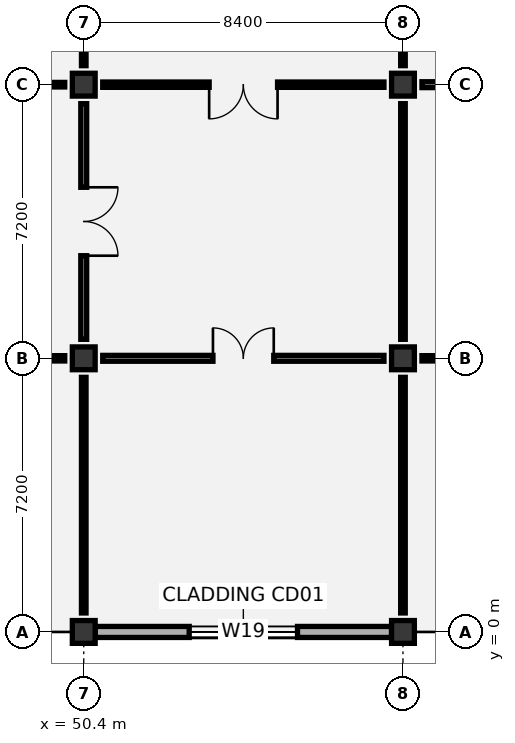
"""IFC4 building model, lengths in metres.
Left out: names, types, materials, properties, quantities, classifications, styles, units other than length and angle.
Written with IfcOpenShell. Run it as: python <this file> out.ifc"""

import sys

from ifc_helpers import new_model, si_unit, direction, frame, frame_2d, origin, origin_2d, place, context, subcontext, project, spatial, rectangle, extrude, element, fill, save


model = new_model("IFC4")
c1 = context("Model", 3, precision=1e-05, world=origin(), true_north=direction((0.0, 1.0)))
c2 = subcontext(c1, "Body", "Model", "MODEL_VIEW")
j1 = project(units=[si_unit("LENGTHUNIT", "METRE"), si_unit("PLANEANGLEUNIT", "RADIAN")], contexts=[c1])
p1 = place(None, origin())
s1 = spatial("IfcSite", under=j1, at=p1, CompositionType="ELEMENT")
p2 = place(p1, origin())
s2 = spatial("IfcBuilding", under=s1, at=p2, CompositionType="ELEMENT")
p3 = place(p2, frame((0.0, 0.0, 11.4)))
s3 = spatial("IfcBuildingStorey", under=s2, at=p3, CompositionType="ELEMENT", Elevation=11.4)
for number, where, z_axis, x_axis in (
    (1, (50.4, 0.0, 0.0), (0.0, 0.0, 1.0), (1.0, 0.0, 0.0)),
    (2, (50.4, 7.2, 0.0), (0.0, 0.0, 1.0), (1.0, 0.0, 0.0)),
    (3, (50.4, 14.4, 0.0), (0.0, 0.0, 1.0), (1.0, 0.0, 0.0)),
    (4, (58.8, 0.0, 0.0), (0.0, 0.0, 1.0), (1.0, 0.0, 0.0)),
    (5, (58.8, 7.2, 0.0), (0.0, 0.0, 1.0), (1.0, 0.0, 0.0)),
    (6, (58.8, 14.4, 0.0), (0.0, 0.0, 1.0), (1.0, 0.0, 0.0)),
):
    element("IfcColumn", number, at=place(p3, frame(where, z_axis=z_axis, x_axis=x_axis)), inside=s3, PredefinedType="COLUMN", context=c2, shape_type="SweptSolid", body=[
        extrude(rectangle(XDim=0.6, YDim=0.6, at=origin_2d()), origin(), (0.0, 0.0, 1.0), 5.4),
    ])
p4 = place(p3, frame((50.7, 0.0, 0.0), z_axis=(0.0, 0.0, 1.0), x_axis=(1.0, 0.0, 0.0)))
e7 = element("IfcWall", 7, at=p4, inside=s3, PredefinedType="SOLIDWALL", context=c2, shape_type="SweptSolid", body=[
    extrude(rectangle(XDim=7.8, YDim=0.29, at=frame_2d((3.9, 0.0))), origin(), (0.0, 0.0, 1.0), 4.52),
])
p5 = place(p4, frame((2.475, 0.0, 0.9)))
e8 = element("IfcOpeningElement", 8, at=p5, cuts=e7, PredefinedType="OPENING", context=c2, shape_type="SweptSolid", body=[
    extrude(rectangle(XDim=2.85, YDim=1.95, at=frame_2d((1.425, 0.975))), frame((0.0, 0.155, 0.0), z_axis=(0.0, -1.0, 0.0), x_axis=(1.0, 0.0, 0.0)), (0.0, 0.0, 1.0), 0.31),
])
p6 = place(p3, frame((50.4, 0.5, 0.0), z_axis=(0.0, 0.0, 1.0), x_axis=(0.0, 1.0, 0.0)))
e9 = element("IfcWall", 9, at=p6, inside=s3, PredefinedType="PARTITIONING", context=c2, shape_type="SweptSolid", body=[
    extrude(rectangle(XDim=6.2, YDim=0.12, at=frame_2d((3.1, 0.0))), origin(), (0.0, 0.0, 1.0), 4.88),
])
p7 = place(p3, frame((42.5, 7.2, 0.0), z_axis=(0.0, 0.0, 1.0), x_axis=(1.0, 0.0, 0.0)))
e10 = element("IfcWall", 10, at=p7, inside=s3, PredefinedType="PARTITIONING", context=c2, shape_type="SweptSolid", body=[
    extrude(rectangle(XDim=7.4, YDim=0.14, at=frame_2d((3.7, 0.0))), origin(), (0.0, 0.0, 1.0), 4.345),
])
p8 = place(p7, frame((2.9, 0.0, 0.0)))
e11 = element("IfcOpeningElement", 11, at=p8, cuts=e10, PredefinedType="OPENING", context=c2, shape_type="SweptSolid", body=[
    extrude(rectangle(XDim=1.6, YDim=2.2, at=frame_2d((0.8, 1.1))), frame((0.0, 0.08, 0.0), z_axis=(0.0, -1.0, 0.0), x_axis=(1.0, 0.0, 0.0)), (0.0, 0.0, 1.0), 0.16),
])
p9 = place(p3, frame((50.4, 7.7, 0.0), z_axis=(0.0, 0.0, 1.0), x_axis=(0.0, 1.0, 0.0)))
e12 = element("IfcWall", 12, at=p9, inside=s3, PredefinedType="PARTITIONING", context=c2, shape_type="SweptSolid", body=[
    extrude(rectangle(XDim=6.2, YDim=0.155, at=frame_2d((3.1, 0.0))), origin(), (0.0, 0.0, 1.0), 4.395),
])
p10 = place(p9, frame((2.2, 0.0, 0.0)))
e13 = element("IfcOpeningElement", 13, at=p10, cuts=e12, PredefinedType="OPENING", context=c2, shape_type="SweptSolid", body=[
    extrude(rectangle(XDim=1.8, YDim=2.25, at=frame_2d((0.9, 1.125))), frame((0.0, 0.087, 0.0), z_axis=(0.0, -1.0, 0.0), x_axis=(1.0, 0.0, 0.0)), (0.0, 0.0, 1.0), 0.175),
])
p11 = place(p3, frame((42.5, 14.4, 0.0), z_axis=(0.0, 0.0, 1.0), x_axis=(1.0, 0.0, 0.0)))
e14 = element("IfcWall", 14, at=p11, inside=s3, PredefinedType="PARTITIONING", context=c2, shape_type="SweptSolid", body=[
    extrude(rectangle(XDim=7.4, YDim=0.12, at=frame_2d((3.7, 0.0))), origin(), (0.0, 0.0, 1.0), 4.345),
])
p12 = place(p3, frame((50.4, 14.9, 0.0), z_axis=(0.0, 0.0, 1.0), x_axis=(0.0, 1.0, 0.0)))
e15 = element("IfcWall", 15, at=p12, inside=s3, PredefinedType="PARTITIONING", context=c2, shape_type="SweptSolid", body=[
    extrude(rectangle(XDim=6.2, YDim=0.12, at=frame_2d((3.1, 0.0))), origin(), (0.0, 0.0, 1.0), 4.595),
])
p13 = place(p3, frame((58.8, 0.5, 0.0), z_axis=(0.0, 0.0, 1.0), x_axis=(0.0, 1.0, 0.0)))
e16 = element("IfcWall", 16, at=p13, inside=s3, PredefinedType="PARTITIONING", context=c2, shape_type="SweptSolid", body=[
    extrude(rectangle(XDim=6.2, YDim=0.12, at=frame_2d((3.1, 0.0))), origin(), (0.0, 0.0, 1.0), 4.47),
])
p14 = place(p3, frame((50.9, 7.2, 0.0), z_axis=(0.0, 0.0, 1.0), x_axis=(1.0, 0.0, 0.0)))
e17 = element("IfcWall", 17, at=p14, inside=s3, PredefinedType="PARTITIONING", context=c2, shape_type="SweptSolid", body=[
    extrude(rectangle(XDim=7.4, YDim=0.155, at=frame_2d((3.7, 0.0))), origin(), (0.0, 0.0, 1.0), 4.345),
])
p15 = place(p14, frame((2.9, 0.0, 0.0)))
e18 = element("IfcOpeningElement", 18, at=p15, cuts=e17, PredefinedType="OPENING", context=c2, shape_type="SweptSolid", body=[
    extrude(rectangle(XDim=1.6, YDim=2.2, at=frame_2d((0.8, 1.1))), frame((0.0, 0.087, 0.0), z_axis=(0.0, -1.0, 0.0), x_axis=(1.0, 0.0, 0.0)), (0.0, 0.0, 1.0), 0.175),
])
p16 = place(p3, frame((58.8, 7.7, 0.0), z_axis=(0.0, 0.0, 1.0), x_axis=(0.0, 1.0, 0.0)))
e19 = element("IfcWall", 19, at=p16, inside=s3, PredefinedType="PARTITIONING", context=c2, shape_type="SweptSolid", body=[
    extrude(rectangle(XDim=6.2, YDim=0.12, at=frame_2d((3.1, 0.0))), origin(), (0.0, 0.0, 1.0), 4.595),
])
p17 = place(p3, frame((50.9, 14.4, 0.0), z_axis=(0.0, 0.0, 1.0), x_axis=(1.0, 0.0, 0.0)))
e20 = element("IfcWall", 20, at=p17, inside=s3, PredefinedType="PARTITIONING", context=c2, shape_type="SweptSolid", body=[
    extrude(rectangle(XDim=7.4, YDim=0.14, at=frame_2d((3.7, 0.0))), origin(), (0.0, 0.0, 1.0), 4.345),
])
p18 = place(p17, frame((2.8, 0.0, 0.0)))
e21 = element("IfcOpeningElement", 21, at=p18, cuts=e20, PredefinedType="OPENING", context=c2, shape_type="SweptSolid", body=[
    extrude(rectangle(XDim=1.8, YDim=2.25, at=frame_2d((0.9, 1.125))), frame((0.0, 0.08, 0.0), z_axis=(0.0, -1.0, 0.0), x_axis=(1.0, 0.0, 0.0)), (0.0, 0.0, 1.0), 0.16),
])
p19 = place(p3, frame((58.8, 14.9, 0.0), z_axis=(0.0, 0.0, 1.0), x_axis=(0.0, 1.0, 0.0)))
e22 = element("IfcWall", 22, at=p19, inside=s3, PredefinedType="PARTITIONING", context=c2, shape_type="SweptSolid", body=[
    extrude(rectangle(XDim=6.2, YDim=0.12, at=frame_2d((3.1, 0.0))), origin(), (0.0, 0.0, 1.0), 4.395),
])
p20 = place(p3, frame((59.3, 7.2, 0.0), z_axis=(0.0, 0.0, 1.0), x_axis=(1.0, 0.0, 0.0)))
e23 = element("IfcWall", 23, at=p20, inside=s3, PredefinedType="PARTITIONING", context=c2, shape_type="SweptSolid", body=[
    extrude(rectangle(XDim=7.4, YDim=0.14, at=frame_2d((3.7, 0.0))), origin(), (0.0, 0.0, 1.0), 4.345),
])
p21 = place(p20, frame((2.9, 0.0, 0.0)))
e24 = element("IfcOpeningElement", 24, at=p21, cuts=e23, PredefinedType="OPENING", context=c2, shape_type="SweptSolid", body=[
    extrude(rectangle(XDim=1.6, YDim=2.2, at=frame_2d((0.8, 1.1))), frame((0.0, 0.08, 0.0), z_axis=(0.0, -1.0, 0.0), x_axis=(1.0, 0.0, 0.0)), (0.0, 0.0, 1.0), 0.16),
])
p22 = place(p3, frame((59.3, 14.4, 0.0), z_axis=(0.0, 0.0, 1.0), x_axis=(1.0, 0.0, 0.0)))
e25 = element("IfcWall", 25, at=p22, inside=s3, PredefinedType="PARTITIONING", context=c2, shape_type="SweptSolid", body=[
    extrude(rectangle(XDim=7.4, YDim=0.155, at=frame_2d((3.7, 0.0))), origin(), (0.0, 0.0, 1.0), 4.345),
])
p23 = place(p22, frame((2.8, 0.0, 0.0)))
e26 = element("IfcOpeningElement", 26, at=p23, cuts=e25, PredefinedType="OPENING", context=c2, shape_type="SweptSolid", body=[
    extrude(rectangle(XDim=1.8, YDim=2.25, at=frame_2d((0.9, 1.125))), frame((0.0, 0.087, 0.0), z_axis=(0.0, -1.0, 0.0), x_axis=(1.0, 0.0, 0.0)), (0.0, 0.0, 1.0), 0.175),
])
p24 = place(p5, origin())
e27 = element("IfcWindow", 27, at=p24, inside=s3, PartitioningType="SINGLE_PANEL", PredefinedType="WINDOW", context=c2, shape_type="SweptSolid", body=[
    extrude(rectangle(XDim=2.85, YDim=1.95, at=frame_2d((1.425, 0.975))), frame((0.0, 0.03, 0.0), z_axis=(0.0, -1.0, 0.0), x_axis=(1.0, 0.0, 0.0)), (0.0, 0.0, 1.0), 0.06),
])
fill(e8, e27)
p25 = place(p10, frame((1.8, 0.0, 0.0), z_axis=(0.0, 0.0, 1.0), x_axis=(-1.0, 0.0, 0.0)))
e28 = element("IfcDoor", 28, at=p25, inside=s3, OperationType="DOUBLE_DOOR_SINGLE_SWING", PredefinedType="DOOR", context=c2, shape_type="SweptSolid", body=[
    extrude(rectangle(XDim=1.8, YDim=2.25, at=frame_2d((0.9, 1.125))), frame((0.0, 0.025, 0.0), z_axis=(0.0, -1.0, 0.0), x_axis=(1.0, 0.0, 0.0)), (0.0, 0.0, 1.0), 0.05),
])
fill(e13, e28)
p26 = place(p15, origin())
e29 = element("IfcDoor", 29, at=p26, inside=s3, OperationType="DOUBLE_DOOR_SINGLE_SWING", PredefinedType="DOOR", context=c2, shape_type="SweptSolid", body=[
    extrude(rectangle(XDim=1.6, YDim=2.2, at=frame_2d((0.8, 1.1))), frame((0.0, 0.025, 0.0), z_axis=(0.0, -1.0, 0.0), x_axis=(1.0, 0.0, 0.0)), (0.0, 0.0, 1.0), 0.05),
])
fill(e18, e29)
p27 = place(p18, frame((1.8, 0.0, 0.0), z_axis=(0.0, 0.0, 1.0), x_axis=(-1.0, 0.0, 0.0)))
e30 = element("IfcDoor", 30, at=p27, inside=s3, OperationType="DOUBLE_DOOR_SINGLE_SWING", PredefinedType="DOOR", context=c2, shape_type="SweptSolid", body=[
    extrude(rectangle(XDim=1.8, YDim=2.25, at=frame_2d((0.9, 1.125))), frame((0.0, 0.025, 0.0), z_axis=(0.0, -1.0, 0.0), x_axis=(1.0, 0.0, 0.0)), (0.0, 0.0, 1.0), 0.05),
])
fill(e21, e30)
save(model, sys.argv[1])
